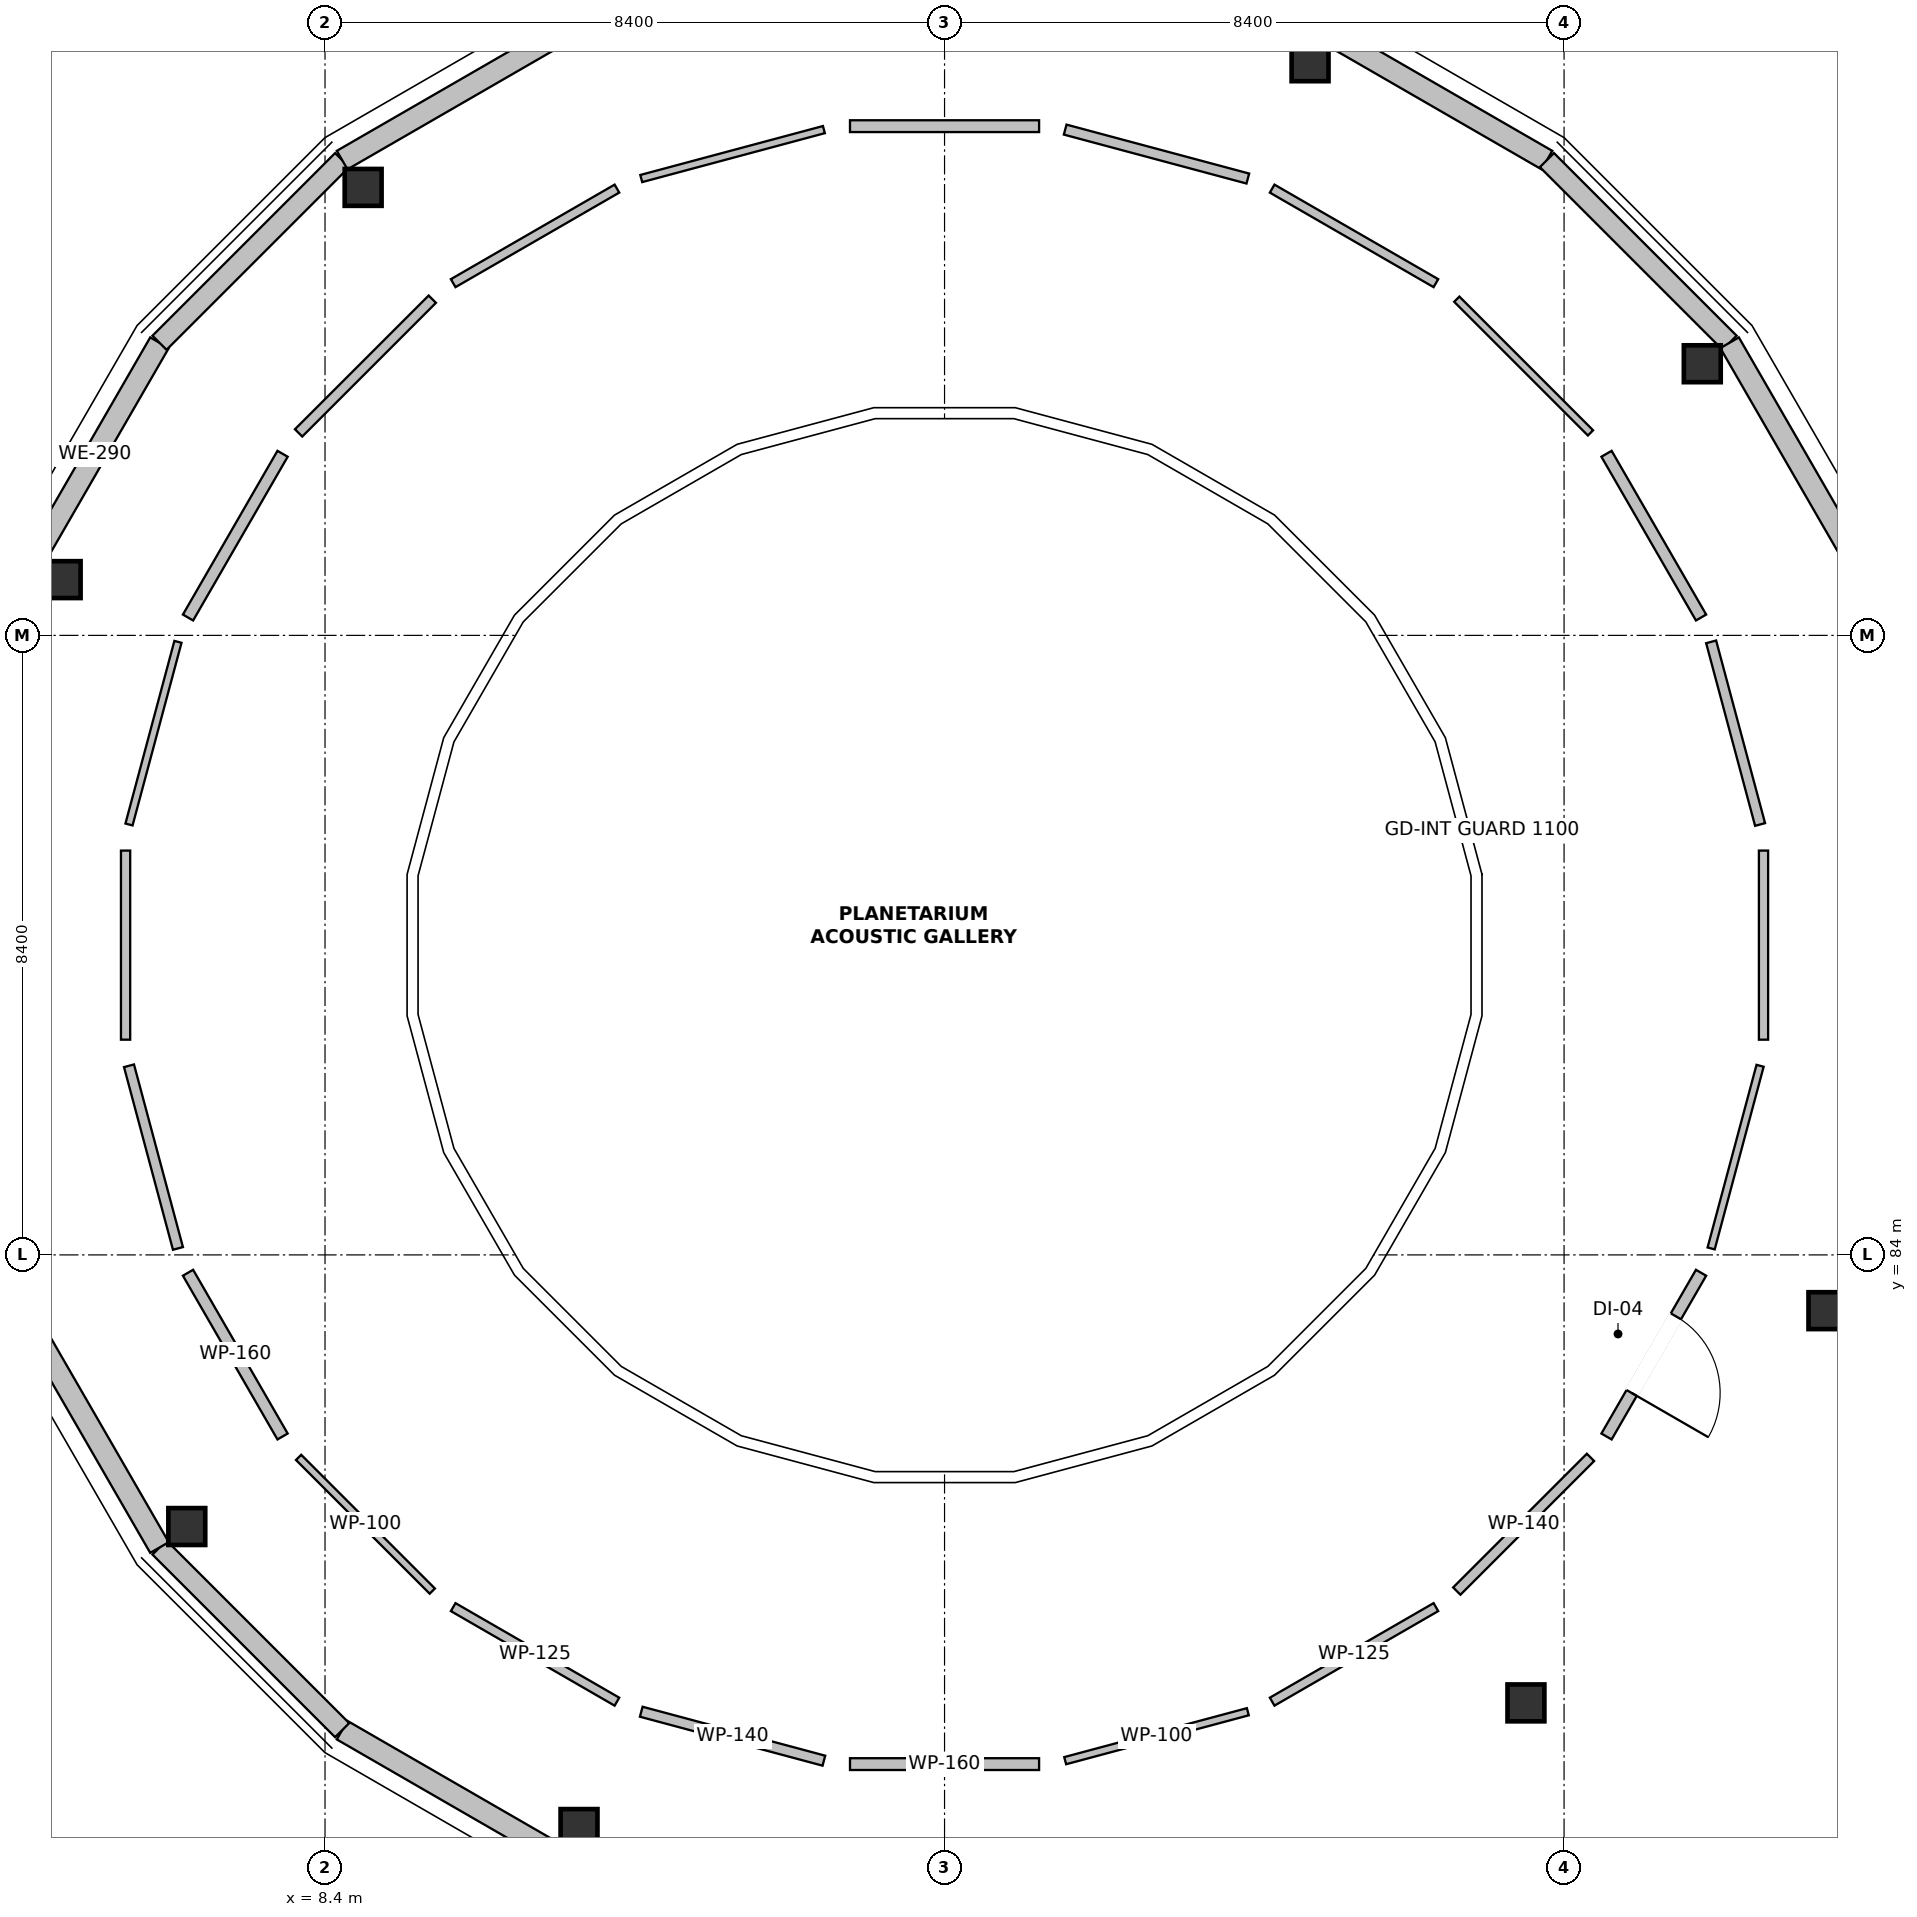
"""IFC4 building model, lengths in metres.
Left out: names, types, materials, properties, quantities, classifications, styles, units other than length and angle.
Written with IfcOpenShell. Run it as: python <this file> out.ifc"""

import sys

from ifc_helpers import new_model, si_unit, direction, frame, frame_2d, origin, origin_2d, place, context, subcontext, project, spatial, rectangle, extrude, element, fill, save


model = new_model("IFC4")
c1 = context("Model", 3, precision=1e-05, world=origin(), true_north=direction((0.0, 1.0)))
c2 = subcontext(c1, "Body", "Model", "MODEL_VIEW")
j1 = project(units=[si_unit("LENGTHUNIT", "METRE"), si_unit("PLANEANGLEUNIT", "RADIAN")], contexts=[c1])
p1 = place(None, origin())
s1 = spatial("IfcSite", under=j1, at=p1, CompositionType="ELEMENT")
p2 = place(p1, origin())
s2 = spatial("IfcBuilding", under=s1, at=p2, CompositionType="ELEMENT")
p3 = place(p2, frame((0.0, 0.0, 9.9)))
s3 = spatial("IfcBuildingStorey", under=s2, at=p3, CompositionType="ELEMENT", Elevation=9.9)
for number, where, z_axis, x_axis in (
    (1, (27.074, 96.083, 0.0), (0.0, 0.0, 1.0), (1.0, 0.0, 0.0)),
    (2, (21.756, 100.164, 0.0), (0.0, 0.0, 1.0), (1.0, 0.0, 0.0)),
    (3, (8.917, 98.474, 0.0), (0.0, 0.0, 1.0), (1.0, 0.0, 0.0)),
    (4, (4.836, 93.156, 0.0), (0.0, 0.0, 1.0), (1.0, 0.0, 0.0)),
    (5, (6.526, 80.317, 0.0), (0.0, 0.0, 1.0), (1.0, 0.0, 0.0)),
    (6, (11.844, 76.236, 0.0), (0.0, 0.0, 1.0), (1.0, 0.0, 0.0)),
    (7, (24.683, 77.926, 0.0), (0.0, 0.0, 1.0), (1.0, 0.0, 0.0)),
    (8, (28.764, 83.244, 0.0), (0.0, 0.0, 1.0), (1.0, 0.0, 0.0)),
):
    element("IfcColumn", number, at=place(p3, frame(where, z_axis=z_axis, x_axis=x_axis)), inside=s3, PredefinedType="COLUMN", context=c2, shape_type="SweptSolid", body=[
        extrude(rectangle(XDim=0.5, YDim=0.5, at=origin_2d()), origin(), (0.0, 0.0, 1.0), 4.5),
    ])
p4 = place(p3, frame((4.405, 93.334, 0.0), z_axis=(0.0, 0.0, 1.0), x_axis=(0.499969831364, 0.866042820954, 0.0)))
e9 = element("IfcWall", 9, at=p4, inside=s3, PredefinedType="SOLIDWALL", context=c2, shape_type="SweptSolid", body=[
    extrude(rectangle(XDim=3.503, YDim=0.29, at=frame_2d((1.751, 0.0))), origin(), (0.0, 0.0, 1.0), 4.29),
])
p5 = place(p3, frame((6.156, 96.368, 0.0), z_axis=(0.0, 0.0, 1.0), x_axis=(0.707106781187, 0.707106781187, 0.0)))
e10 = element("IfcWall", 10, at=p5, inside=s3, PredefinedType="SOLIDWALL", context=c2, shape_type="SweptSolid", body=[
    extrude(rectangle(XDim=3.502, YDim=0.27, at=frame_2d((1.751, 0.0))), origin(), (0.0, 0.0, 1.0), 4.29),
])
p6 = place(p3, frame((8.632, 98.844, 0.0), z_axis=(0.0, 0.0, 1.0), x_axis=(0.866042820954, 0.499969831364, 0.0)))
e11 = element("IfcWall", 11, at=p6, inside=s3, PredefinedType="SOLIDWALL", context=c2, shape_type="SweptSolid", body=[
    extrude(rectangle(XDim=3.503, YDim=0.29, at=frame_2d((1.751, 0.0))), origin(), (0.0, 0.0, 1.0), 4.29),
])
p7 = place(p3, frame((21.934, 100.595, 0.0), z_axis=(0.0, 0.0, 1.0), x_axis=(0.86602539607, -0.500000013362, 0.0)))
e12 = element("IfcWall", 12, at=p7, inside=s3, PredefinedType="SOLIDWALL", context=c2, shape_type="SweptSolid", body=[
    extrude(rectangle(XDim=3.502, YDim=0.29, at=frame_2d((1.751, 0.0))), origin(), (0.0, 0.0, 1.0), 4.29),
])
p8 = place(p3, frame((24.968, 98.844, 0.0), z_axis=(0.0, 0.0, 1.0), x_axis=(0.707106781187, -0.707106781187, 0.0)))
e13 = element("IfcWall", 13, at=p8, inside=s3, PredefinedType="SOLIDWALL", context=c2, shape_type="SweptSolid", body=[
    extrude(rectangle(XDim=3.502, YDim=0.27, at=frame_2d((1.751, 0.0))), origin(), (0.0, 0.0, 1.0), 4.29),
])
for number, where, z_axis, x_axis in (
    (14, (27.444, 96.368, 0.0), (0.0, 0.0, 1.0), (0.5, -0.866, 0.0)),
    (15, (11.666, 75.805, 0.0), (0.0, 0.0, 1.0), (-0.866, 0.5, 0.0)),
):
    element("IfcWall", number, at=place(p3, frame(where, z_axis=z_axis, x_axis=x_axis)), inside=s3, PredefinedType="SOLIDWALL", context=c2, shape_type="SweptSolid", body=[
        extrude(rectangle(XDim=3.503, YDim=0.29, at=frame_2d((1.751, 0.0))), origin(), (0.0, 0.0, 1.0), 4.29),
    ])
p9 = place(p3, frame((8.632, 77.556, 0.0), z_axis=(0.0, 0.0, 1.0), x_axis=(-0.707106781187, 0.707106781187, 0.0)))
e16 = element("IfcWall", 16, at=p9, inside=s3, PredefinedType="SOLIDWALL", context=c2, shape_type="SweptSolid", body=[
    extrude(rectangle(XDim=3.502, YDim=0.27, at=frame_2d((1.751, 0.0))), origin(), (0.0, 0.0, 1.0), 4.29),
])
p10 = place(p3, frame((6.156, 80.032, 0.0), z_axis=(0.0, 0.0, 1.0), x_axis=(-0.500000013362, 0.86602539607, 0.0)))
e17 = element("IfcWall", 17, at=p10, inside=s3, PredefinedType="SOLIDWALL", context=c2, shape_type="SweptSolid", body=[
    extrude(rectangle(XDim=3.502, YDim=0.29, at=frame_2d((1.751, 0.0))), origin(), (0.0, 0.0, 1.0), 4.29),
])
p11 = place(p3, frame((27.058, 83.758, 0.0), z_axis=(0.0, 0.0, 1.0), x_axis=(-0.50004118441, -0.866001624648, 0.0)))
e18 = element("IfcWall", 18, at=p11, inside=s3, PredefinedType="PARTITIONING", context=c2, shape_type="SweptSolid", body=[
    extrude(rectangle(XDim=2.564, YDim=0.16, at=frame_2d((1.282, 0.0))), origin(), (0.0, 0.0, 1.0), 4.22),
])
p12 = place(p11, frame((0.682, 0.0, 0.0)))
e19 = element("IfcOpeningElement", 19, at=p12, cuts=e18, PredefinedType="OPENING", context=c2, shape_type="SweptSolid", body=[
    extrude(rectangle(XDim=1.2, YDim=2.2, at=frame_2d((0.6, 1.1))), frame((0.0, 0.092, 0.0), z_axis=(0.0, -1.0, 0.0), x_axis=(1.0, 0.0, 0.0)), (0.0, 0.0, 1.0), 0.184),
])
p13 = place(p3, frame((25.558, 81.255, 0.0), z_axis=(0.0, 0.0, 1.0), x_axis=(-0.707106781187, -0.707106781187, 0.0)))
e20 = element("IfcWall", 20, at=p13, inside=s3, PredefinedType="PARTITIONING", context=c2, shape_type="SweptSolid", body=[
    extrude(rectangle(XDim=2.564, YDim=0.14, at=frame_2d((1.282, 0.0))), origin(), (0.0, 0.0, 1.0), 4.22),
])
p14 = place(p3, frame((23.462, 79.224, 0.0), z_axis=(0.0, 0.0, 1.0), x_axis=(-0.866001624648, -0.50004118441, 0.0)))
e21 = element("IfcWall", 21, at=p14, inside=s3, PredefinedType="PARTITIONING", context=c2, shape_type="SweptSolid", body=[
    extrude(rectangle(XDim=2.564, YDim=0.125, at=frame_2d((1.282, 0.0))), origin(), (0.0, 0.0, 1.0), 4.22),
])
p15 = place(p3, frame((20.912, 77.806, 0.0), z_axis=(0.0, 0.0, 1.0), x_axis=(-0.965921270769, -0.258836045938, 0.0)))
e22 = element("IfcWall", 22, at=p15, inside=s3, PredefinedType="PARTITIONING", context=c2, shape_type="SweptSolid", body=[
    extrude(rectangle(XDim=2.564, YDim=0.1, at=frame_2d((1.282, 0.0))), origin(), (0.0, 0.0, 1.0), 4.22),
])
p16 = place(p3, frame((18.082, 77.096, 0.0), z_axis=(0.0, 0.0, 1.0), x_axis=(-1.0, 0.0, 0.0)))
e23 = element("IfcWall", 23, at=p16, inside=s3, PredefinedType="PARTITIONING", context=c2, shape_type="SweptSolid", body=[
    extrude(rectangle(XDim=2.564, YDim=0.16, at=frame_2d((1.282, 0.0))), origin(), (0.0, 0.0, 1.0), 4.22),
])
p17 = place(p3, frame((15.164, 77.142, 0.0), z_axis=(0.0, 0.0, 1.0), x_axis=(-0.965927649949, 0.258812239014, 0.0)))
e24 = element("IfcWall", 24, at=p17, inside=s3, PredefinedType="PARTITIONING", context=c2, shape_type="SweptSolid", body=[
    extrude(rectangle(XDim=2.564, YDim=0.14, at=frame_2d((1.282, 0.0))), origin(), (0.0, 0.0, 1.0), 4.22),
])
p18 = place(p3, frame((12.358, 77.942, 0.0), z_axis=(0.0, 0.0, 1.0), x_axis=(-0.866001624648, 0.50004118441, 0.0)))
e25 = element("IfcWall", 25, at=p18, inside=s3, PredefinedType="PARTITIONING", context=c2, shape_type="SweptSolid", body=[
    extrude(rectangle(XDim=2.564, YDim=0.125, at=frame_2d((1.282, 0.0))), origin(), (0.0, 0.0, 1.0), 4.22),
])
p19 = place(p3, frame((9.854, 79.442, 0.0), z_axis=(0.0, 0.0, 1.0), x_axis=(-0.707059166172, 0.707154392995, 0.0)))
e26 = element("IfcWall", 26, at=p19, inside=s3, PredefinedType="PARTITIONING", context=c2, shape_type="SweptSolid", body=[
    extrude(rectangle(XDim=2.564, YDim=0.1, at=frame_2d((1.282, 0.0))), origin(), (0.0, 0.0, 1.0), 4.22),
])
p20 = place(p3, frame((7.824, 81.538, 0.0), z_axis=(0.0, 0.0, 1.0), x_axis=(-0.50004118441, 0.866001624648, 0.0)))
e27 = element("IfcWall", 27, at=p20, inside=s3, PredefinedType="PARTITIONING", context=c2, shape_type="SweptSolid", body=[
    extrude(rectangle(XDim=2.564, YDim=0.16, at=frame_2d((1.282, 0.0))), origin(), (0.0, 0.0, 1.0), 4.22),
])
p21 = place(p3, frame((6.406, 84.088, 0.0), z_axis=(0.0, 0.0, 1.0), x_axis=(-0.258836045938, 0.965921270769, 0.0)))
e28 = element("IfcWall", 28, at=p21, inside=s3, PredefinedType="PARTITIONING", context=c2, shape_type="SweptSolid", body=[
    extrude(rectangle(XDim=2.564, YDim=0.14, at=frame_2d((1.282, 0.0))), origin(), (0.0, 0.0, 1.0), 4.22),
])
p22 = place(p3, frame((5.696, 86.918, 0.0), z_axis=(0.0, 0.0, 1.0), x_axis=(0.0, 1.0, 0.0)))
e29 = element("IfcWall", 29, at=p22, inside=s3, PredefinedType="PARTITIONING", context=c2, shape_type="SweptSolid", body=[
    extrude(rectangle(XDim=2.564, YDim=0.125, at=frame_2d((1.282, 0.0))), origin(), (0.0, 0.0, 1.0), 4.22),
])
p23 = place(p3, frame((5.742, 89.836, 0.0), z_axis=(0.0, 0.0, 1.0), x_axis=(0.258812239014, 0.965927649949, 0.0)))
e30 = element("IfcWall", 30, at=p23, inside=s3, PredefinedType="PARTITIONING", context=c2, shape_type="SweptSolid", body=[
    extrude(rectangle(XDim=2.564, YDim=0.1, at=frame_2d((1.282, 0.0))), origin(), (0.0, 0.0, 1.0), 4.22),
])
p24 = place(p3, frame((6.542, 92.642, 0.0), z_axis=(0.0, 0.0, 1.0), x_axis=(0.50004118441, 0.866001624648, 0.0)))
e31 = element("IfcWall", 31, at=p24, inside=s3, PredefinedType="PARTITIONING", context=c2, shape_type="SweptSolid", body=[
    extrude(rectangle(XDim=2.564, YDim=0.16, at=frame_2d((1.282, 0.0))), origin(), (0.0, 0.0, 1.0), 4.22),
])
p25 = place(p3, frame((8.042, 95.146, 0.0), z_axis=(0.0, 0.0, 1.0), x_axis=(0.707106781187, 0.707106781187, 0.0)))
e32 = element("IfcWall", 32, at=p25, inside=s3, PredefinedType="PARTITIONING", context=c2, shape_type="SweptSolid", body=[
    extrude(rectangle(XDim=2.564, YDim=0.14, at=frame_2d((1.282, 0.0))), origin(), (0.0, 0.0, 1.0), 4.22),
])
p26 = place(p3, frame((10.138, 97.176, 0.0), z_axis=(0.0, 0.0, 1.0), x_axis=(0.866001624648, 0.50004118441, 0.0)))
e33 = element("IfcWall", 33, at=p26, inside=s3, PredefinedType="PARTITIONING", context=c2, shape_type="SweptSolid", body=[
    extrude(rectangle(XDim=2.564, YDim=0.125, at=frame_2d((1.282, 0.0))), origin(), (0.0, 0.0, 1.0), 4.22),
])
p27 = place(p3, frame((12.688, 98.594, 0.0), z_axis=(0.0, 0.0, 1.0), x_axis=(0.965927649949, 0.258812239014, 0.0)))
e34 = element("IfcWall", 34, at=p27, inside=s3, PredefinedType="PARTITIONING", context=c2, shape_type="SweptSolid", body=[
    extrude(rectangle(XDim=2.564, YDim=0.1, at=frame_2d((1.282, 0.0))), origin(), (0.0, 0.0, 1.0), 4.22),
])
p28 = place(p3, frame((15.518, 99.304, 0.0), z_axis=(0.0, 0.0, 1.0), x_axis=(1.0, 0.0, 0.0)))
e35 = element("IfcWall", 35, at=p28, inside=s3, PredefinedType="PARTITIONING", context=c2, shape_type="SweptSolid", body=[
    extrude(rectangle(XDim=2.564, YDim=0.16, at=frame_2d((1.282, 0.0))), origin(), (0.0, 0.0, 1.0), 4.22),
])
p29 = place(p3, frame((18.436, 99.258, 0.0), z_axis=(0.0, 0.0, 1.0), x_axis=(0.965921270769, -0.258836045938, 0.0)))
e36 = element("IfcWall", 36, at=p29, inside=s3, PredefinedType="PARTITIONING", context=c2, shape_type="SweptSolid", body=[
    extrude(rectangle(XDim=2.564, YDim=0.14, at=frame_2d((1.282, 0.0))), origin(), (0.0, 0.0, 1.0), 4.22),
])
p30 = place(p3, frame((21.242, 98.458, 0.0), z_axis=(0.0, 0.0, 1.0), x_axis=(0.866001624648, -0.50004118441, 0.0)))
e37 = element("IfcWall", 37, at=p30, inside=s3, PredefinedType="PARTITIONING", context=c2, shape_type="SweptSolid", body=[
    extrude(rectangle(XDim=2.564, YDim=0.125, at=frame_2d((1.282, 0.0))), origin(), (0.0, 0.0, 1.0), 4.22),
])
p31 = place(p3, frame((23.745, 96.958, 0.0), z_axis=(0.0, 0.0, 1.0), x_axis=(0.707154392995, -0.707059166172, 0.0)))
e38 = element("IfcWall", 38, at=p31, inside=s3, PredefinedType="PARTITIONING", context=c2, shape_type="SweptSolid", body=[
    extrude(rectangle(XDim=2.564, YDim=0.1, at=frame_2d((1.282, 0.0))), origin(), (0.0, 0.0, 1.0), 4.22),
])
p32 = place(p3, frame((25.776, 94.862, 0.0), z_axis=(0.0, 0.0, 1.0), x_axis=(0.50004118441, -0.866001624648, 0.0)))
e39 = element("IfcWall", 39, at=p32, inside=s3, PredefinedType="PARTITIONING", context=c2, shape_type="SweptSolid", body=[
    extrude(rectangle(XDim=2.564, YDim=0.16, at=frame_2d((1.282, 0.0))), origin(), (0.0, 0.0, 1.0), 4.22),
])
p33 = place(p3, frame((27.194, 92.312, 0.0), z_axis=(0.0, 0.0, 1.0), x_axis=(0.258812239014, -0.965927649949, 0.0)))
e40 = element("IfcWall", 40, at=p33, inside=s3, PredefinedType="PARTITIONING", context=c2, shape_type="SweptSolid", body=[
    extrude(rectangle(XDim=2.564, YDim=0.14, at=frame_2d((1.282, 0.0))), origin(), (0.0, 0.0, 1.0), 4.22),
])
p34 = place(p3, frame((27.904, 89.482, 0.0), z_axis=(0.0, 0.0, 1.0), x_axis=(0.0, -1.0, 0.0)))
e41 = element("IfcWall", 41, at=p34, inside=s3, PredefinedType="PARTITIONING", context=c2, shape_type="SweptSolid", body=[
    extrude(rectangle(XDim=2.564, YDim=0.125, at=frame_2d((1.282, 0.0))), origin(), (0.0, 0.0, 1.0), 4.22),
])
p35 = place(p3, frame((27.858, 86.564, 0.0), z_axis=(0.0, 0.0, 1.0), x_axis=(-0.258836045938, -0.965921270769, 0.0)))
e42 = element("IfcWall", 42, at=p35, inside=s3, PredefinedType="PARTITIONING", context=c2, shape_type="SweptSolid", body=[
    extrude(rectangle(XDim=2.564, YDim=0.1, at=frame_2d((1.282, 0.0))), origin(), (0.0, 0.0, 1.0), 4.22),
])
p36 = place(p12, origin())
e43 = element("IfcDoor", 43, at=p36, inside=s3, OperationType="SINGLE_SWING_RIGHT", PredefinedType="DOOR", context=c2, shape_type="SweptSolid", body=[
    extrude(rectangle(XDim=1.2, YDim=2.2, at=frame_2d((0.6, 1.1))), frame((0.0, 0.025, 0.0), z_axis=(0.0, -1.0, 0.0), x_axis=(1.0, 0.0, 0.0)), (0.0, 0.0, 1.0), 0.05),
])
fill(e19, e43)
save(model, sys.argv[1])
